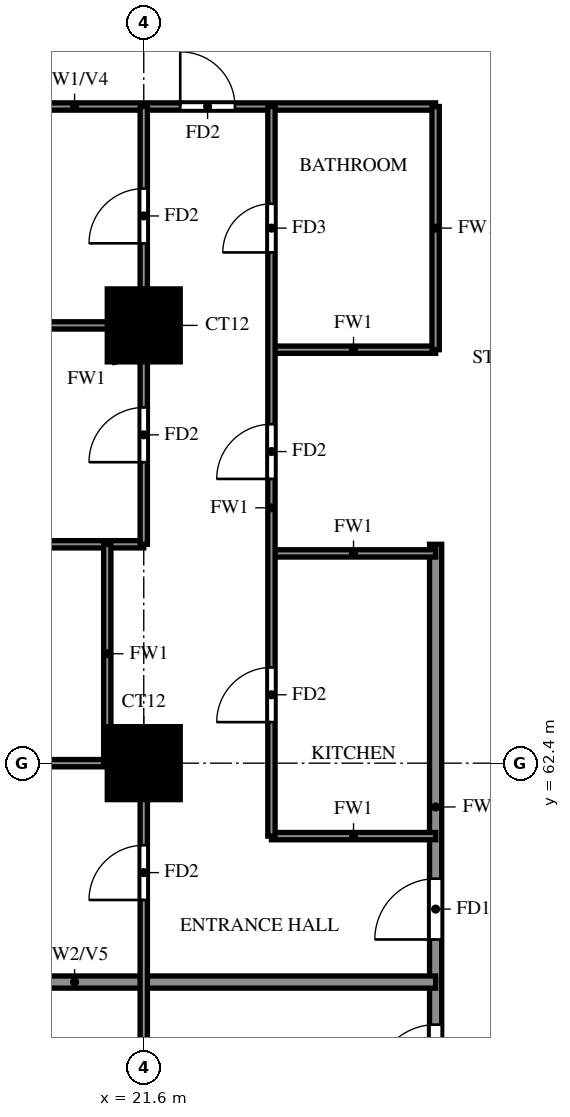
"""IFC4 building model, lengths in metres.
Left out: names, types, materials, properties, quantities, classifications, styles, units other than length and angle.
Written with IfcOpenShell. Run it as: python <this file> out.ifc"""

import sys

from ifc_helpers import new_model, si_unit, direction, frame, frame_2d, origin, origin_2d, place, context, subcontext, project, spatial, rectangle, extrude, source, transform, mapped, element, fill, save


model = new_model("IFC4")
c1 = context("Model", 3, precision=1e-05, world=origin(), true_north=direction((0.0, 1.0)))
c2 = subcontext(c1, "Body", "Model", "MODEL_VIEW")
j1 = project(units=[si_unit("LENGTHUNIT", "METRE"), si_unit("PLANEANGLEUNIT", "RADIAN")], contexts=[c1])
p1 = place(None, origin())
s1 = spatial("IfcSite", under=j1, at=p1, CompositionType="ELEMENT")
p2 = place(p1, origin())
s2 = spatial("IfcBuilding", under=s1, at=p2, CompositionType="ELEMENT")
p3 = place(p2, frame((0.0, 0.0, 97.0)))
s3 = spatial("IfcBuildingStorey", under=s2, at=p3, CompositionType="ELEMENT", Elevation=97.0)
m1 = source(origin(), c2, "Body", "SweptSolid", [
    extrude(rectangle(XDim=1.2, YDim=1.2, at=origin_2d()), origin(), (0.0, 0.0, 1.0), 3.18),
])
for number, where, z_axis, x_axis in (
    (1, (21.6, 62.4, 0.0), (0.0, 0.0, 1.0), (1.0, 0.0, 0.0)),
    (2, (21.6, 69.6, 0.0), (0.0, 0.0, 1.0), (1.0, 0.0, 0.0)),
):
    element("IfcColumn", number, at=place(p3, frame(where, z_axis=z_axis, x_axis=x_axis)), inside=s3, PredefinedType="COLUMN", context=c2, shape_type="MappedRepresentation", body=[
        mapped(m1, transform((0.0, 0.0, 0.0))),
    ])
p4 = place(p3, frame((26.4, 56.4, 0.0), z_axis=(0.0, 0.0, 1.0), x_axis=(0.0, 1.0, 0.0)))
e3 = element("IfcWall", 3, at=p4, inside=s3, PredefinedType="SOLIDWALL", context=c2, shape_type="SweptSolid", body=[
    extrude(rectangle(XDim=9.6, YDim=0.2, at=frame_2d((4.8, 0.0))), origin(), (0.0, 0.0, 1.0), 3.18),
])
p5 = place(p4, frame((0.7, 0.0, 0.0)))
e4 = element("IfcOpeningElement", 4, at=p5, cuts=e3, PredefinedType="OPENING", context=c2, shape_type="SweptSolid", body=[
    extrude(rectangle(XDim=1.0, YDim=2.1, at=frame_2d((0.5, 1.05))), frame((0.0, 0.11, 0.0), z_axis=(0.0, -1.0, 0.0), x_axis=(1.0, 0.0, 0.0)), (0.0, 0.0, 1.0), 0.22),
])
p6 = place(p4, frame((3.1, 0.0, 0.0)))
e5 = element("IfcOpeningElement", 5, at=p6, cuts=e3, PredefinedType="OPENING", context=c2, shape_type="SweptSolid", body=[
    extrude(rectangle(XDim=1.0, YDim=2.1, at=frame_2d((0.5, 1.05))), frame((0.0, 0.11, 0.0), z_axis=(0.0, -1.0, 0.0), x_axis=(1.0, 0.0, 0.0)), (0.0, 0.0, 1.0), 0.22),
])
p7 = place(p3, frame((14.525, 58.8, 0.0), z_axis=(0.0, 0.0, 1.0), x_axis=(1.0, 0.0, 0.0)))
e6 = element("IfcWall", 6, at=p7, inside=s3, PredefinedType="SOLIDWALL", context=c2, shape_type="SweptSolid", body=[
    extrude(rectangle(XDim=11.875, YDim=0.2, at=frame_2d((5.938, 0.0))), origin(), (0.0, 0.0, 1.0), 2.28),
])
p8 = place(p3, frame((23.7, 61.2, 0.0), z_axis=(0.0, 0.0, 1.0), x_axis=(1.0, 0.0, 0.0)))
e7 = element("IfcWall", 7, at=p8, inside=s3, PredefinedType="PARTITIONING", context=c2, shape_type="SweptSolid", body=[
    extrude(rectangle(XDim=2.7, YDim=0.12, at=frame_2d((1.35, 0.0))), origin(), (0.0, 0.0, 1.0), 3.18),
])
p9 = place(p3, frame((14.525, 62.4, 0.0), z_axis=(0.0, 0.0, 1.0), x_axis=(1.0, 0.0, 0.0)))
e8 = element("IfcWall", 8, at=p9, inside=s3, PredefinedType="PARTITIONING", context=c2, shape_type="SweptSolid", body=[
    extrude(rectangle(XDim=7.075, YDim=0.12, at=frame_2d((3.538, 0.0))), origin(), (0.0, 0.0, 1.0), 3.18),
])
p10 = place(p9, frame((2.837, 0.0, 0.0)))
e9 = element("IfcOpeningElement", 9, at=p10, cuts=e8, PredefinedType="OPENING", context=c2, shape_type="SweptSolid", body=[
    extrude(rectangle(XDim=0.8, YDim=2.1, at=frame_2d((0.4, 1.05))), frame((0.0, 0.07, 0.0), z_axis=(0.0, -1.0, 0.0), x_axis=(1.0, 0.0, 0.0)), (0.0, 0.0, 1.0), 0.14),
])
p11 = place(p3, frame((23.7, 65.85, 0.0), z_axis=(0.0, 0.0, 1.0), x_axis=(1.0, 0.0, 0.0)))
e10 = element("IfcWall", 10, at=p11, inside=s3, PredefinedType="PARTITIONING", context=c2, shape_type="SweptSolid", body=[
    extrude(rectangle(XDim=2.7, YDim=0.12, at=frame_2d((1.35, 0.0))), origin(), (0.0, 0.0, 1.0), 3.18),
])
p12 = place(p3, frame((14.525, 66.0, 0.0), z_axis=(0.0, 0.0, 1.0), x_axis=(1.0, 0.0, 0.0)))
e11 = element("IfcWall", 11, at=p12, inside=s3, PredefinedType="PARTITIONING", context=c2, shape_type="SweptSolid", body=[
    extrude(rectangle(XDim=7.075, YDim=0.12, at=frame_2d((3.538, 0.0))), origin(), (0.0, 0.0, 1.0), 2.28),
])
p13 = place(p3, frame((23.7, 69.2, 0.0), z_axis=(0.0, 0.0, 1.0), x_axis=(1.0, 0.0, 0.0)))
e12 = element("IfcWall", 12, at=p13, inside=s3, PredefinedType="PARTITIONING", context=c2, shape_type="SweptSolid", body=[
    extrude(rectangle(XDim=2.7, YDim=0.12, at=frame_2d((1.35, 0.0))), origin(), (0.0, 0.0, 1.0), 3.18),
])
p14 = place(p3, frame((14.525, 69.6, 0.0), z_axis=(0.0, 0.0, 1.0), x_axis=(1.0, 0.0, 0.0)))
e13 = element("IfcWall", 13, at=p14, inside=s3, PredefinedType="PARTITIONING", context=c2, shape_type="SweptSolid", body=[
    extrude(rectangle(XDim=7.075, YDim=0.12, at=frame_2d((3.538, 0.0))), origin(), (0.0, 0.0, 1.0), 3.18),
])
p15 = place(p3, frame((14.525, 73.2, 0.0), z_axis=(0.0, 0.0, 1.0), x_axis=(1.0, 0.0, 0.0)))
e14 = element("IfcWall", 14, at=p15, inside=s3, PredefinedType="PARTITIONING", context=c2, shape_type="SweptSolid", body=[
    extrude(rectangle(XDim=11.875, YDim=0.12, at=frame_2d((5.938, 0.0))), origin(), (0.0, 0.0, 1.0), 2.28),
])
p16 = place(p15, frame((7.675, 0.0, 0.0)))
e15 = element("IfcOpeningElement", 15, at=p16, cuts=e14, PredefinedType="OPENING", context=c2, shape_type="SweptSolid", body=[
    extrude(rectangle(XDim=0.9, YDim=2.1, at=frame_2d((0.45, 1.05))), frame((0.0, 0.07, 0.0), z_axis=(0.0, -1.0, 0.0), x_axis=(1.0, 0.0, 0.0)), (0.0, 0.0, 1.0), 0.14),
])
p17 = place(p3, frame((21.0, 62.4, 0.0), z_axis=(0.0, 0.0, 1.0), x_axis=(0.0, 1.0, 0.0)))
e16 = element("IfcWall", 16, at=p17, inside=s3, PredefinedType="PARTITIONING", context=c2, shape_type="SweptSolid", body=[
    extrude(rectangle(XDim=3.6, YDim=0.12, at=frame_2d((1.8, 0.0))), origin(), (0.0, 0.0, 1.0), 3.18),
])
p18 = place(p3, frame((21.6, 33.725, 0.0), z_axis=(0.0, 0.0, 1.0), x_axis=(0.0, 1.0, 0.0)))
e17 = element("IfcWall", 17, at=p18, inside=s3, PredefinedType="PARTITIONING", context=c2, shape_type="SweptSolid", body=[
    extrude(rectangle(XDim=28.675, YDim=0.12, at=frame_2d((14.337, 0.0))), origin(), (0.0, 0.0, 1.0), 3.18),
])
p19 = place(p18, frame((7.775, 0.0, 0.0)))
e18 = element("IfcOpeningElement", 18, at=p19, cuts=e17, PredefinedType="OPENING", context=c2, shape_type="SweptSolid", body=[
    extrude(rectangle(XDim=0.9, YDim=2.1, at=frame_2d((0.45, 1.05))), frame((0.0, 0.07, 0.0), z_axis=(0.0, -1.0, 0.0), x_axis=(1.0, 0.0, 0.0)), (0.0, 0.0, 1.0), 0.14),
])
p20 = place(p18, frame((17.125, 0.0, 0.0)))
e19 = element("IfcOpeningElement", 19, at=p20, cuts=e17, PredefinedType="OPENING", context=c2, shape_type="SweptSolid", body=[
    extrude(rectangle(XDim=1.5, YDim=2.1, at=frame_2d((0.75, 1.05))), frame((0.0, 0.07, 0.0), z_axis=(0.0, -1.0, 0.0), x_axis=(1.0, 0.0, 0.0)), (0.0, 0.0, 1.0), 0.14),
])
p21 = place(p18, frame((22.825, 0.0, 0.0)))
e20 = element("IfcOpeningElement", 20, at=p21, cuts=e17, PredefinedType="OPENING", context=c2, shape_type="SweptSolid", body=[
    extrude(rectangle(XDim=0.9, YDim=2.1, at=frame_2d((0.45, 1.05))), frame((0.0, 0.07, 0.0), z_axis=(0.0, -1.0, 0.0), x_axis=(1.0, 0.0, 0.0)), (0.0, 0.0, 1.0), 0.14),
])
p22 = place(p18, frame((26.425, 0.0, 0.0)))
e21 = element("IfcOpeningElement", 21, at=p22, cuts=e17, PredefinedType="OPENING", context=c2, shape_type="SweptSolid", body=[
    extrude(rectangle(XDim=0.9, YDim=2.1, at=frame_2d((0.45, 1.05))), frame((0.0, 0.07, 0.0), z_axis=(0.0, -1.0, 0.0), x_axis=(1.0, 0.0, 0.0)), (0.0, 0.0, 1.0), 0.14),
])
p23 = place(p3, frame((21.6, 66.0, 0.0), z_axis=(0.0, 0.0, 1.0), x_axis=(0.0, 1.0, 0.0)))
e22 = element("IfcWall", 22, at=p23, inside=s3, PredefinedType="PARTITIONING", context=c2, shape_type="SweptSolid", body=[
    extrude(rectangle(XDim=7.2, YDim=0.12, at=frame_2d((3.6, 0.0))), origin(), (0.0, 0.0, 1.0), 3.18),
])
p24 = place(p23, frame((1.35, 0.0, 0.0)))
e23 = element("IfcOpeningElement", 23, at=p24, cuts=e22, PredefinedType="OPENING", context=c2, shape_type="SweptSolid", body=[
    extrude(rectangle(XDim=0.9, YDim=2.1, at=frame_2d((0.45, 1.05))), frame((0.0, 0.07, 0.0), z_axis=(0.0, -1.0, 0.0), x_axis=(1.0, 0.0, 0.0)), (0.0, 0.0, 1.0), 0.14),
])
p25 = place(p23, frame((4.95, 0.0, 0.0)))
e24 = element("IfcOpeningElement", 24, at=p25, cuts=e22, PredefinedType="OPENING", context=c2, shape_type="SweptSolid", body=[
    extrude(rectangle(XDim=0.9, YDim=2.1, at=frame_2d((0.45, 1.05))), frame((0.0, 0.07, 0.0), z_axis=(0.0, -1.0, 0.0), x_axis=(1.0, 0.0, 0.0)), (0.0, 0.0, 1.0), 0.14),
])
p26 = place(p3, frame((23.7, 61.2, 0.0), z_axis=(0.0, 0.0, 1.0), x_axis=(0.0, 1.0, 0.0)))
e25 = element("IfcWall", 25, at=p26, inside=s3, PredefinedType="PARTITIONING", context=c2, shape_type="SweptSolid", body=[
    extrude(rectangle(XDim=12.0, YDim=0.12, at=frame_2d((6.0, 0.0))), origin(), (0.0, 0.0, 1.0), 3.18),
])
p27 = place(p26, frame((1.875, 0.0, 0.0)))
e26 = element("IfcOpeningElement", 26, at=p27, cuts=e25, PredefinedType="OPENING", context=c2, shape_type="SweptSolid", body=[
    extrude(rectangle(XDim=0.9, YDim=2.1, at=frame_2d((0.45, 1.05))), frame((0.0, 0.07, 0.0), z_axis=(0.0, -1.0, 0.0), x_axis=(1.0, 0.0, 0.0)), (0.0, 0.0, 1.0), 0.14),
])
p28 = place(p26, frame((5.875, 0.0, 0.0)))
e27 = element("IfcOpeningElement", 27, at=p28, cuts=e25, PredefinedType="OPENING", context=c2, shape_type="SweptSolid", body=[
    extrude(rectangle(XDim=0.9, YDim=2.1, at=frame_2d((0.45, 1.05))), frame((0.0, 0.07, 0.0), z_axis=(0.0, -1.0, 0.0), x_axis=(1.0, 0.0, 0.0)), (0.0, 0.0, 1.0), 0.14),
])
p29 = place(p26, frame((9.6, 0.0, 0.0)))
e28 = element("IfcOpeningElement", 28, at=p29, cuts=e25, PredefinedType="OPENING", context=c2, shape_type="SweptSolid", body=[
    extrude(rectangle(XDim=0.8, YDim=2.1, at=frame_2d((0.4, 1.05))), frame((0.0, 0.07, 0.0), z_axis=(0.0, -1.0, 0.0), x_axis=(1.0, 0.0, 0.0)), (0.0, 0.0, 1.0), 0.14),
])
p30 = place(p3, frame((26.4, 69.2, 0.0), z_axis=(0.0, 0.0, 1.0), x_axis=(0.0, 1.0, 0.0)))
e29 = element("IfcWall", 29, at=p30, inside=s3, PredefinedType="PARTITIONING", context=c2, shape_type="SweptSolid", body=[
    extrude(rectangle(XDim=4.0, YDim=0.12, at=frame_2d((2.0, 0.0))), origin(), (0.0, 0.0, 1.0), 3.18),
])
p31 = place(p5, origin())
e30 = element("IfcDoor", 30, at=p31, inside=s3, OperationType="SINGLE_SWING_LEFT", PredefinedType="DOOR", context=c2, shape_type="SweptSolid", body=[
    extrude(rectangle(XDim=1.0, YDim=2.1, at=frame_2d((0.5, 1.05))), frame((0.0, 0.025, 0.0), z_axis=(0.0, -1.0, 0.0), x_axis=(1.0, 0.0, 0.0)), (0.0, 0.0, 1.0), 0.05),
])
fill(e4, e30)
p32 = place(p6, origin())
e31 = element("IfcDoor", 31, at=p32, inside=s3, OperationType="SINGLE_SWING_LEFT", PredefinedType="DOOR", context=c2, shape_type="SweptSolid", body=[
    extrude(rectangle(XDim=1.0, YDim=2.1, at=frame_2d((0.5, 1.05))), frame((0.0, 0.025, 0.0), z_axis=(0.0, -1.0, 0.0), x_axis=(1.0, 0.0, 0.0)), (0.0, 0.0, 1.0), 0.05),
])
fill(e5, e31)
p33 = place(p22, origin())
e32 = element("IfcDoor", 32, at=p33, inside=s3, OperationType="SINGLE_SWING_RIGHT", PredefinedType="DOOR", context=c2, shape_type="SweptSolid", body=[
    extrude(rectangle(XDim=0.9, YDim=2.1, at=frame_2d((0.45, 1.05))), frame((0.0, 0.025, 0.0), z_axis=(0.0, -1.0, 0.0), x_axis=(1.0, 0.0, 0.0)), (0.0, 0.0, 1.0), 0.05),
])
fill(e21, e32)
p34 = place(p24, origin())
e33 = element("IfcDoor", 33, at=p34, inside=s3, OperationType="SINGLE_SWING_LEFT", PredefinedType="DOOR", context=c2, shape_type="SweptSolid", body=[
    extrude(rectangle(XDim=0.9, YDim=2.1, at=frame_2d((0.45, 1.05))), frame((0.0, 0.025, 0.0), z_axis=(0.0, -1.0, 0.0), x_axis=(1.0, 0.0, 0.0)), (0.0, 0.0, 1.0), 0.05),
])
fill(e23, e33)
p35 = place(p25, origin())
e34 = element("IfcDoor", 34, at=p35, inside=s3, OperationType="SINGLE_SWING_RIGHT", PredefinedType="DOOR", context=c2, shape_type="SweptSolid", body=[
    extrude(rectangle(XDim=0.9, YDim=2.1, at=frame_2d((0.45, 1.05))), frame((0.0, 0.025, 0.0), z_axis=(0.0, -1.0, 0.0), x_axis=(1.0, 0.0, 0.0)), (0.0, 0.0, 1.0), 0.05),
])
fill(e24, e34)
p36 = place(p16, origin())
e35 = element("IfcDoor", 35, at=p36, inside=s3, OperationType="SINGLE_SWING_LEFT", PredefinedType="DOOR", context=c2, shape_type="SweptSolid", body=[
    extrude(rectangle(XDim=0.9, YDim=2.1, at=frame_2d((0.45, 1.05))), frame((0.0, 0.025, 0.0), z_axis=(0.0, -1.0, 0.0), x_axis=(1.0, 0.0, 0.0)), (0.0, 0.0, 1.0), 0.05),
])
fill(e15, e35)
p37 = place(p27, origin())
e36 = element("IfcDoor", 36, at=p37, inside=s3, OperationType="SINGLE_SWING_LEFT", PredefinedType="DOOR", context=c2, shape_type="SweptSolid", body=[
    extrude(rectangle(XDim=0.9, YDim=2.1, at=frame_2d((0.45, 1.05))), frame((0.0, 0.025, 0.0), z_axis=(0.0, -1.0, 0.0), x_axis=(1.0, 0.0, 0.0)), (0.0, 0.0, 1.0), 0.05),
])
fill(e26, e36)
p38 = place(p28, origin())
e37 = element("IfcDoor", 37, at=p38, inside=s3, OperationType="SINGLE_SWING_RIGHT", PredefinedType="DOOR", context=c2, shape_type="SweptSolid", body=[
    extrude(rectangle(XDim=0.9, YDim=2.1, at=frame_2d((0.45, 1.05))), frame((0.0, 0.025, 0.0), z_axis=(0.0, -1.0, 0.0), x_axis=(1.0, 0.0, 0.0)), (0.0, 0.0, 1.0), 0.05),
])
fill(e27, e37)
p39 = place(p29, origin())
e38 = element("IfcDoor", 38, at=p39, inside=s3, OperationType="SINGLE_SWING_LEFT", PredefinedType="DOOR", context=c2, shape_type="SweptSolid", body=[
    extrude(rectangle(XDim=0.8, YDim=2.1, at=frame_2d((0.4, 1.05))), frame((0.0, 0.025, 0.0), z_axis=(0.0, -1.0, 0.0), x_axis=(1.0, 0.0, 0.0)), (0.0, 0.0, 1.0), 0.05),
])
fill(e28, e38)
save(model, sys.argv[1])
